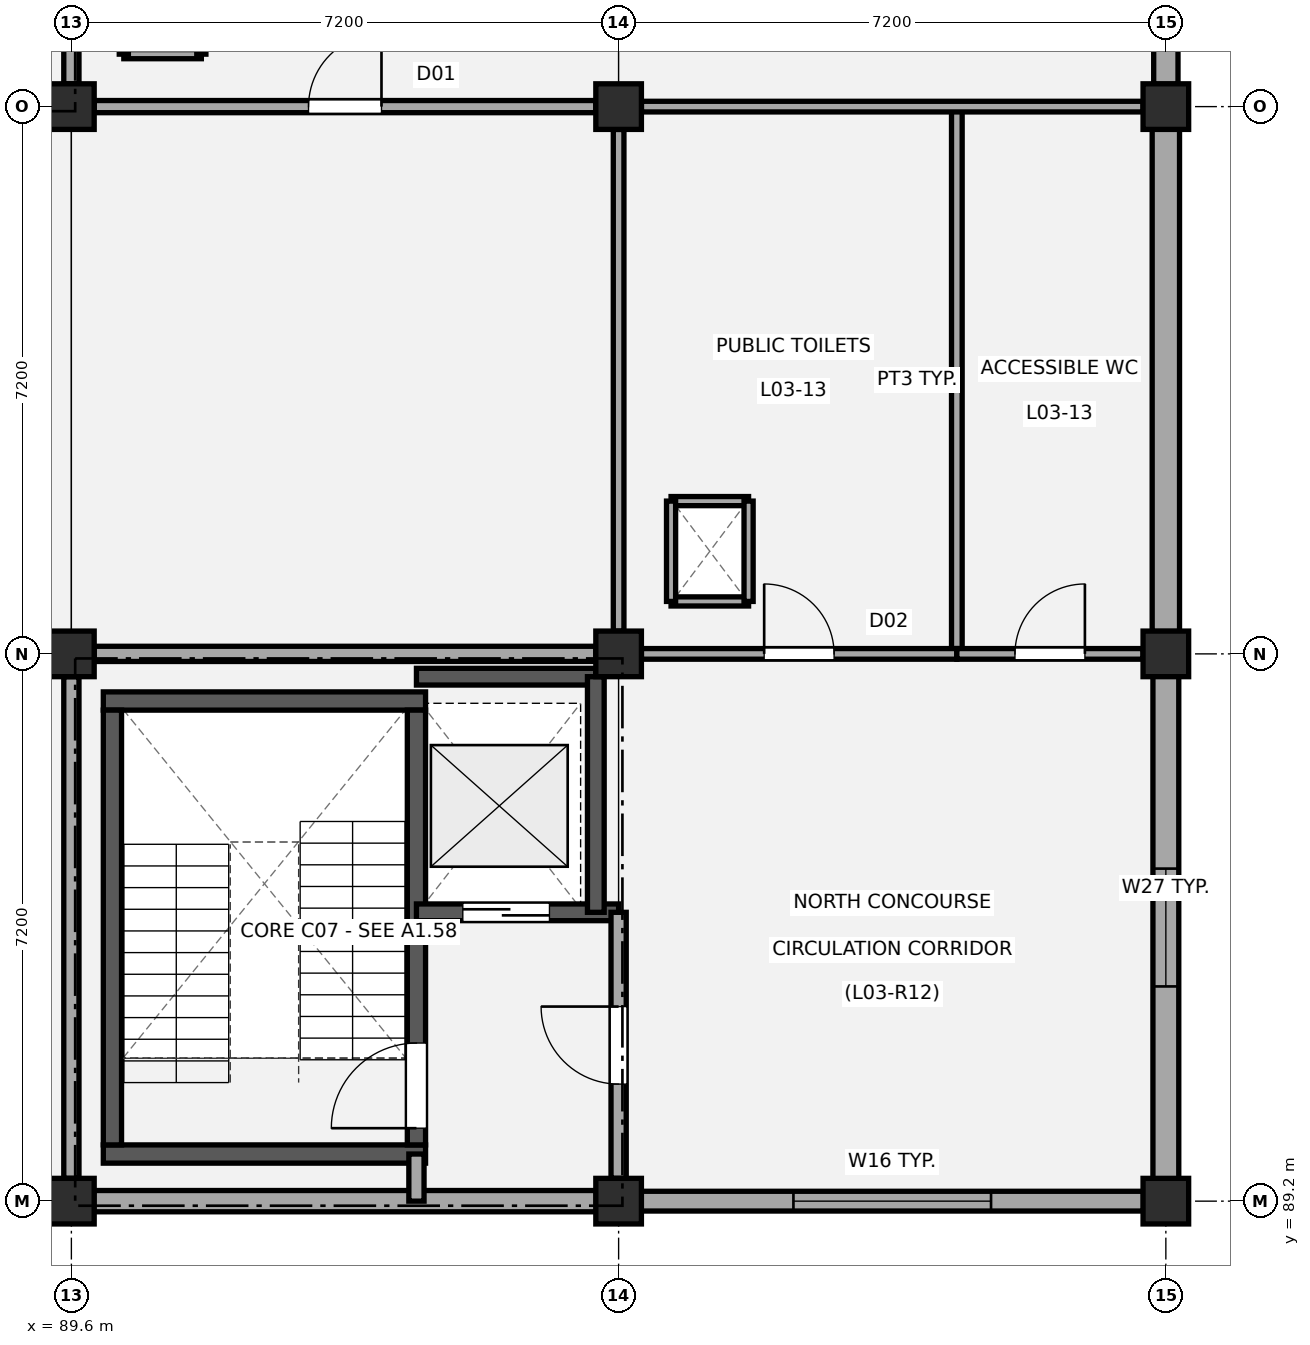
"""IFC4 building model, lengths in metres.
Left out: names, types, materials, properties, quantities, classifications, styles, units other than length and angle.
Written with IfcOpenShell. Run it as: python <this file> out.ifc"""

import sys

from ifc_helpers import new_model, si_unit, direction, frame, frame_2d, origin, origin_2d, place, context, subcontext, project, spatial, rectangle, extrude, element, fill, save


model = new_model("IFC4")
c1 = context("Model", 3, precision=1e-05, world=origin(), true_north=direction((0.0, 1.0)))
c2 = subcontext(c1, "Body", "Model", "MODEL_VIEW")
j1 = project(units=[si_unit("LENGTHUNIT", "METRE"), si_unit("PLANEANGLEUNIT", "RADIAN")], contexts=[c1])
p1 = place(None, origin())
s1 = spatial("IfcSite", under=j1, at=p1, CompositionType="ELEMENT")
p2 = place(p1, origin())
s2 = spatial("IfcBuilding", under=s1, at=p2, CompositionType="ELEMENT")
p3 = place(p2, frame((0.0, 0.0, 13.5)))
s3 = spatial("IfcBuildingStorey", under=s2, at=p3, CompositionType="ELEMENT", Elevation=13.5)
for number, where, z_axis, x_axis in (
    (1, (89.6, 89.2, 0.0), (0.0, 0.0, 1.0), (1.0, 0.0, 0.0)),
    (2, (89.6, 96.4, 0.0), (0.0, 0.0, 1.0), (1.0, 0.0, 0.0)),
    (3, (89.6, 103.6, 0.0), (0.0, 0.0, 1.0), (1.0, 0.0, 0.0)),
    (4, (96.8, 89.2, 0.0), (0.0, 0.0, 1.0), (1.0, 0.0, 0.0)),
    (5, (96.8, 96.4, 0.0), (0.0, 0.0, 1.0), (1.0, 0.0, 0.0)),
    (6, (96.8, 103.6, 0.0), (0.0, 0.0, 1.0), (1.0, 0.0, 0.0)),
    (7, (104.0, 89.2, 0.0), (0.0, 0.0, 1.0), (1.0, 0.0, 0.0)),
    (8, (104.0, 96.4, 0.0), (0.0, 0.0, 1.0), (1.0, 0.0, 0.0)),
    (9, (104.0, 103.6, 0.0), (0.0, 0.0, 1.0), (1.0, 0.0, 0.0)),
):
    element("IfcColumn", number, at=place(p3, frame(where, z_axis=z_axis, x_axis=x_axis)), inside=s3, PredefinedType="COLUMN", context=c2, shape_type="SweptSolid", body=[
        extrude(rectangle(XDim=0.6, YDim=0.6, at=origin_2d()), origin(), (0.0, 0.0, 1.0), 4.14),
    ])
p4 = place(p3, frame((96.505, 89.2, 0.0), z_axis=(0.0, 0.0, 1.0), x_axis=(-1.0, 0.0, 0.0)))
e10 = element("IfcWall", 10, at=p4, inside=s3, PredefinedType="STANDARD", context=c2, shape_type="SweptSolid", body=[
    extrude(rectangle(XDim=6.61, YDim=0.28, at=frame_2d((3.305, 0.0))), origin(), (0.0, 0.0, 1.0), 3.3),
])
p5 = place(p3, frame((103.705, 89.2, 0.0), z_axis=(0.0, 0.0, 1.0), x_axis=(-1.0, 0.0, 0.0)))
e11 = element("IfcWall", 11, at=p5, inside=s3, PredefinedType="STANDARD", context=c2, shape_type="SweptSolid", body=[
    extrude(rectangle(XDim=6.61, YDim=0.26, at=frame_2d((3.305, 0.0))), origin(), (0.0, 0.0, 1.0), 3.32),
])
p6 = place(p5, frame((2.005, 0.0, 0.95)))
e12 = element("IfcOpeningElement", 12, at=p6, cuts=e11, PredefinedType="OPENING", context=c2, shape_type="SweptSolid", body=[
    extrude(rectangle(XDim=2.6, YDim=1.65, at=frame_2d((1.3, 0.825))), frame((0.0, 0.14, 0.0), z_axis=(0.0, -1.0, 0.0), x_axis=(1.0, 0.0, 0.0)), (0.0, 0.0, 1.0), 0.28),
])
p7 = place(p3, frame((104.0, 96.105, 0.0), z_axis=(0.0, 0.0, 1.0), x_axis=(0.0, -1.0, 0.0)))
e13 = element("IfcWall", 13, at=p7, inside=s3, PredefinedType="STANDARD", context=c2, shape_type="SweptSolid", body=[
    extrude(rectangle(XDim=6.61, YDim=0.34, at=frame_2d((3.305, 0.0))), origin(), (0.0, 0.0, 1.0), 3.32),
])
p8 = place(p7, frame((2.53, 0.0, 0.95)))
e14 = element("IfcOpeningElement", 14, at=p8, cuts=e13, PredefinedType="OPENING", context=c2, shape_type="SweptSolid", body=[
    extrude(rectangle(XDim=1.55, YDim=1.25, at=frame_2d((0.775, 0.625))), frame((0.0, 0.18, 0.0), z_axis=(0.0, -1.0, 0.0), x_axis=(1.0, 0.0, 0.0)), (0.0, 0.0, 1.0), 0.36),
])
p9 = place(p3, frame((104.0, 103.305, 0.0), z_axis=(0.0, 0.0, 1.0), x_axis=(0.0, -1.0, 0.0)))
e15 = element("IfcWall", 15, at=p9, inside=s3, PredefinedType="STANDARD", context=c2, shape_type="SweptSolid", body=[
    extrude(rectangle(XDim=6.61, YDim=0.36, at=frame_2d((3.305, 0.0))), origin(), (0.0, 0.0, 1.0), 3.32),
])
p10 = place(p3, frame((104.0, 111.88, 0.0), z_axis=(0.0, 0.0, 1.0), x_axis=(0.0, -1.0, 0.0)))
e16 = element("IfcWall", 16, at=p10, inside=s3, PredefinedType="STANDARD", context=c2, shape_type="SweptSolid", body=[
    extrude(rectangle(XDim=7.985, YDim=0.32, at=frame_2d((3.992, 0.0))), origin(), (0.0, 0.0, 1.0), 3.32),
])
p11 = place(p10, frame((3.117, 0.0, 0.95)))
e17 = element("IfcOpeningElement", 17, at=p11, cuts=e16, PredefinedType="OPENING", context=c2, shape_type="SweptSolid", body=[
    extrude(rectangle(XDim=1.75, YDim=1.3, at=frame_2d((0.875, 0.65))), frame((0.0, 0.17, 0.0), z_axis=(0.0, -1.0, 0.0), x_axis=(1.0, 0.0, 0.0)), (0.0, 0.0, 1.0), 0.34),
])
p12 = place(p3, frame((89.6, 103.9, 0.0), z_axis=(0.0, 0.0, 1.0), x_axis=(0.0, 1.0, 0.0)))
e18 = element("IfcWall", 18, at=p12, inside=s3, PredefinedType="PARTITIONING", context=c2, shape_type="SweptSolid", body=[
    extrude(rectangle(XDim=3.5, YDim=0.2, at=frame_2d((1.75, 0.0))), origin(), (0.0, 0.0, 1.0), 3.2),
])
for number, where, z_axis, x_axis in (
    (19, (90.02, 89.82, 0.0), (0.0, 0.0, 1.0), (1.0, 0.0, 0.0)),
    (20, (90.02, 95.78, 0.0), (0.0, 0.0, 1.0), (1.0, 0.0, 0.0)),
):
    element("IfcWall", number, at=place(p3, frame(where, z_axis=z_axis, x_axis=x_axis)), inside=s3, PredefinedType="SHEAR", context=c2, shape_type="SweptSolid", body=[
        extrude(rectangle(XDim=4.24, YDim=0.24, at=frame_2d((2.12, 0.0))), origin(), (0.0, 0.0, 1.0), 3.86),
    ])
p13 = place(p3, frame((90.14, 89.94, 0.0), z_axis=(0.0, 0.0, 1.0), x_axis=(0.0, 1.0, 0.0)))
e21 = element("IfcWall", 21, at=p13, inside=s3, PredefinedType="SHEAR", context=c2, shape_type="SweptSolid", body=[
    extrude(rectangle(XDim=5.72, YDim=0.24, at=frame_2d((2.86, 0.0))), origin(), (0.0, 0.0, 1.0), 3.86),
])
p14 = place(p3, frame((94.14, 89.94, 0.0), z_axis=(0.0, 0.0, 1.0), x_axis=(0.0, 1.0, 0.0)))
e22 = element("IfcWall", 22, at=p14, inside=s3, PredefinedType="SHEAR", context=c2, shape_type="SweptSolid", body=[
    extrude(rectangle(XDim=5.72, YDim=0.24, at=frame_2d((2.86, 0.0))), origin(), (0.0, 0.0, 1.0), 3.86),
])
p15 = place(p14, frame((0.22, 0.0, 0.0)))
e23 = element("IfcOpeningElement", 23, at=p15, cuts=e22, PredefinedType="OPENING", context=c2, shape_type="SweptSolid", body=[
    extrude(rectangle(XDim=1.12, YDim=2.15, at=frame_2d((0.56, 1.075))), frame((0.0, 0.13, 0.0), z_axis=(0.0, -1.0, 0.0), x_axis=(1.0, 0.0, 0.0)), (0.0, 0.0, 1.0), 0.26),
])
p16 = place(p3, frame((94.14, 93.0, 0.0), z_axis=(0.0, 0.0, 1.0), x_axis=(1.0, 0.0, 0.0)))
e24 = element("IfcWall", 24, at=p16, inside=s3, PredefinedType="SHEAR", context=c2, shape_type="SweptSolid", body=[
    extrude(rectangle(XDim=2.66, YDim=0.22, at=frame_2d((1.33, 0.0))), origin(), (0.0, 0.0, 1.0), 3.86),
])
p17 = place(p16, frame((0.61, 0.0, 0.0)))
e25 = element("IfcOpeningElement", 25, at=p17, cuts=e24, PredefinedType="OPENING", context=c2, shape_type="SweptSolid", body=[
    extrude(rectangle(XDim=1.14, YDim=2.15, at=frame_2d((0.57, 1.075))), frame((0.0, 0.12, 0.0), z_axis=(0.0, -1.0, 0.0), x_axis=(1.0, 0.0, 0.0)), (0.0, 0.0, 1.0), 0.24),
])
p18 = place(p3, frame((94.14, 96.1, 0.0), z_axis=(0.0, 0.0, 1.0), x_axis=(1.0, 0.0, 0.0)))
e26 = element("IfcWall", 26, at=p18, inside=s3, PredefinedType="SHEAR", context=c2, shape_type="SweptSolid", body=[
    extrude(rectangle(XDim=2.36, YDim=0.22, at=frame_2d((1.18, 0.0))), origin(), (0.0, 0.0, 1.0), 3.86),
])
p19 = place(p3, frame((96.5, 93.0, 0.0), z_axis=(0.0, 0.0, 1.0), x_axis=(0.0, 1.0, 0.0)))
e27 = element("IfcWall", 27, at=p19, inside=s3, PredefinedType="SHEAR", context=c2, shape_type="SweptSolid", body=[
    extrude(rectangle(XDim=3.1, YDim=0.22, at=frame_2d((1.55, 0.0))), origin(), (0.0, 0.0, 1.0), 3.86),
])
p20 = place(p3, frame((94.14, 89.2, 0.0), z_axis=(0.0, 0.0, 1.0), x_axis=(0.0, 1.0, 0.0)))
e28 = element("IfcWall", 28, at=p20, inside=s3, PredefinedType="PARTITIONING", context=c2, shape_type="SweptSolid", body=[
    extrude(rectangle(XDim=0.62, YDim=0.2, at=frame_2d((0.31, 0.0))), origin(), (0.0, 0.0, 1.0), 3.3),
])
p21 = place(p3, frame((89.6, 89.5, 0.0), z_axis=(0.0, 0.0, 1.0), x_axis=(0.0, 1.0, 0.0)))
e29 = element("IfcWall", 29, at=p21, inside=s3, PredefinedType="PARTITIONING", context=c2, shape_type="SweptSolid", body=[
    extrude(rectangle(XDim=6.6, YDim=0.2, at=frame_2d((3.3, 0.0))), origin(), (0.0, 0.0, 1.0), 3.2),
])
p22 = place(p3, frame((96.8, 89.5, 0.0), z_axis=(0.0, 0.0, 1.0), x_axis=(0.0, 1.0, 0.0)))
e30 = element("IfcWall", 30, at=p22, inside=s3, PredefinedType="PARTITIONING", context=c2, shape_type="SweptSolid", body=[
    extrude(rectangle(XDim=3.5, YDim=0.2, at=frame_2d((1.75, 0.0))), origin(), (0.0, 0.0, 1.0), 3.2),
])
p23 = place(p22, frame((1.24, 0.0, 0.0)))
e31 = element("IfcOpeningElement", 31, at=p23, cuts=e30, PredefinedType="OPENING", context=c2, shape_type="SweptSolid", body=[
    extrude(rectangle(XDim=1.02, YDim=2.15, at=frame_2d((0.51, 1.075))), frame((0.0, 0.11, 0.0), z_axis=(0.0, -1.0, 0.0), x_axis=(1.0, 0.0, 0.0)), (0.0, 0.0, 1.0), 0.22),
])
p24 = place(p3, frame((89.9, 96.4, 0.0), z_axis=(0.0, 0.0, 1.0), x_axis=(1.0, 0.0, 0.0)))
e32 = element("IfcWall", 32, at=p24, inside=s3, PredefinedType="PARTITIONING", context=c2, shape_type="SweptSolid", body=[
    extrude(rectangle(XDim=6.6, YDim=0.2, at=frame_2d((3.3, 0.0))), origin(), (0.0, 0.0, 1.0), 3.25),
])
p25 = place(p3, frame((90.29, 104.29, 0.0), z_axis=(0.0, 0.0, 1.0), x_axis=(1.0, 0.0, 0.0)))
e33 = element("IfcWall", 33, at=p25, inside=s3, PredefinedType="PARTITIONING", context=c2, shape_type="SweptSolid", body=[
    extrude(rectangle(XDim=1.02, YDim=0.12, at=frame_2d((0.51, 0.0))), origin(), (0.0, 0.0, 1.0), 3.84),
])
for number, where, z_axis, x_axis in (
    (34, (90.29, 104.29, 0.0), (0.0, 0.0, 1.0), (0.0, 1.0, 0.0)),
    (35, (91.31, 104.29, 0.0), (0.0, 0.0, 1.0), (0.0, 1.0, 0.0)),
):
    element("IfcWall", number, at=place(p3, frame(where, z_axis=z_axis, x_axis=x_axis)), inside=s3, PredefinedType="PARTITIONING", context=c2, shape_type="SweptSolid", body=[
        extrude(rectangle(XDim=1.32, YDim=0.12, at=frame_2d((0.66, 0.0))), origin(), (0.0, 0.0, 1.0), 3.84),
    ])
for number, where, z_axis, x_axis in (
    (36, (97.49, 97.09, 0.0), (0.0, 0.0, 1.0), (1.0, 0.0, 0.0)),
    (37, (97.49, 98.41, 0.0), (0.0, 0.0, 1.0), (1.0, 0.0, 0.0)),
):
    element("IfcWall", number, at=place(p3, frame(where, z_axis=z_axis, x_axis=x_axis)), inside=s3, PredefinedType="PARTITIONING", context=c2, shape_type="SweptSolid", body=[
        extrude(rectangle(XDim=1.02, YDim=0.12, at=frame_2d((0.51, 0.0))), origin(), (0.0, 0.0, 1.0), 3.86),
    ])
for number, where, z_axis, x_axis in (
    (38, (97.49, 97.09, 0.0), (0.0, 0.0, 1.0), (0.0, 1.0, 0.0)),
    (39, (98.51, 97.09, 0.0), (0.0, 0.0, 1.0), (0.0, 1.0, 0.0)),
):
    element("IfcWall", number, at=place(p3, frame(where, z_axis=z_axis, x_axis=x_axis)), inside=s3, PredefinedType="PARTITIONING", context=c2, shape_type="SweptSolid", body=[
        extrude(rectangle(XDim=1.32, YDim=0.12, at=frame_2d((0.66, 0.0))), origin(), (0.0, 0.0, 1.0), 3.86),
    ])
p26 = place(p3, frame((101.25, 96.4, 0.0), z_axis=(0.0, 0.0, 1.0), x_axis=(0.0, 1.0, 0.0)))
e40 = element("IfcWall", 40, at=p26, inside=s3, PredefinedType="PARTITIONING", context=c2, shape_type="SweptSolid", body=[
    extrude(rectangle(XDim=7.2, YDim=0.14, at=frame_2d((3.6, 0.0))), origin(), (0.0, 0.0, 1.0), 3.3),
])
p27 = place(p3, frame((97.1, 96.4, 0.0), z_axis=(0.0, 0.0, 1.0), x_axis=(1.0, 0.0, 0.0)))
e41 = element("IfcWall", 41, at=p27, inside=s3, PredefinedType="PARTITIONING", context=c2, shape_type="SweptSolid", body=[
    extrude(rectangle(XDim=4.15, YDim=0.14, at=frame_2d((2.075, 0.0))), origin(), (0.0, 0.0, 1.0), 3.22),
])
p28 = place(p27, frame((1.615, 0.0, 0.0)))
e42 = element("IfcOpeningElement", 42, at=p28, cuts=e41, PredefinedType="OPENING", context=c2, shape_type="SweptSolid", body=[
    extrude(rectangle(XDim=0.92, YDim=2.08, at=frame_2d((0.46, 1.04))), frame((0.0, 0.08, 0.0), z_axis=(0.0, -1.0, 0.0), x_axis=(1.0, 0.0, 0.0)), (0.0, 0.0, 1.0), 0.16),
])
p29 = place(p3, frame((101.25, 96.4, 0.0), z_axis=(0.0, 0.0, 1.0), x_axis=(1.0, 0.0, 0.0)))
e43 = element("IfcWall", 43, at=p29, inside=s3, PredefinedType="PARTITIONING", context=c2, shape_type="SweptSolid", body=[
    extrude(rectangle(XDim=2.45, YDim=0.14, at=frame_2d((1.225, 0.0))), origin(), (0.0, 0.0, 1.0), 3.22),
])
p30 = place(p29, frame((0.765, 0.0, 0.0)))
e44 = element("IfcOpeningElement", 44, at=p30, cuts=e43, PredefinedType="OPENING", context=c2, shape_type="SweptSolid", body=[
    extrude(rectangle(XDim=0.92, YDim=2.08, at=frame_2d((0.46, 1.04))), frame((0.0, 0.08, 0.0), z_axis=(0.0, -1.0, 0.0), x_axis=(1.0, 0.0, 0.0)), (0.0, 0.0, 1.0), 0.16),
])
p31 = place(p3, frame((97.1, 103.6, 0.0), z_axis=(0.0, 0.0, 1.0), x_axis=(1.0, 0.0, 0.0)))
e45 = element("IfcWall", 45, at=p31, inside=s3, PredefinedType="PARTITIONING", context=c2, shape_type="SweptSolid", body=[
    extrude(rectangle(XDim=6.6, YDim=0.14, at=frame_2d((3.3, 0.0))), origin(), (0.0, 0.0, 1.0), 3.27),
])
p32 = place(p3, frame((96.8, 96.7, 0.0), z_axis=(0.0, 0.0, 1.0), x_axis=(0.0, 1.0, 0.0)))
e46 = element("IfcWall", 46, at=p32, inside=s3, PredefinedType="PARTITIONING", context=c2, shape_type="SweptSolid", body=[
    extrude(rectangle(XDim=6.6, YDim=0.14, at=frame_2d((3.3, 0.0))), origin(), (0.0, 0.0, 1.0), 3.25),
])
p33 = place(p3, frame((89.9, 103.6, 0.0), z_axis=(0.0, 0.0, 1.0), x_axis=(1.0, 0.0, 0.0)))
e47 = element("IfcWall", 47, at=p33, inside=s3, PredefinedType="PARTITIONING", context=c2, shape_type="SweptSolid", body=[
    extrude(rectangle(XDim=6.6, YDim=0.16, at=frame_2d((3.3, 0.0))), origin(), (0.0, 0.0, 1.0), 3.2),
])
p34 = place(p33, frame((2.82, 0.0, 0.0)))
e48 = element("IfcOpeningElement", 48, at=p34, cuts=e47, PredefinedType="OPENING", context=c2, shape_type="SweptSolid", body=[
    extrude(rectangle(XDim=0.96, YDim=2.1, at=frame_2d((0.48, 1.05))), frame((0.0, 0.09, 0.0), z_axis=(0.0, -1.0, 0.0), x_axis=(1.0, 0.0, 0.0)), (0.0, 0.0, 1.0), 0.18),
])
p35 = place(p6, origin())
e49 = element("IfcWindow", 49, at=p35, inside=s3, PartitioningType="SINGLE_PANEL", PredefinedType="WINDOW", context=c2, shape_type="SweptSolid", body=[
    extrude(rectangle(XDim=2.6, YDim=1.65, at=frame_2d((1.3, 0.825))), frame((0.0, 0.03, 0.0), z_axis=(0.0, -1.0, 0.0), x_axis=(1.0, 0.0, 0.0)), (0.0, 0.0, 1.0), 0.06),
])
fill(e12, e49)
p36 = place(p8, origin())
e50 = element("IfcWindow", 50, at=p36, inside=s3, PartitioningType="SINGLE_PANEL", PredefinedType="WINDOW", context=c2, shape_type="SweptSolid", body=[
    extrude(rectangle(XDim=1.55, YDim=1.25, at=frame_2d((0.775, 0.625))), frame((0.0, 0.03, 0.0), z_axis=(0.0, -1.0, 0.0), x_axis=(1.0, 0.0, 0.0)), (0.0, 0.0, 1.0), 0.06),
])
fill(e14, e50)
p37 = place(p15, origin())
e51 = element("IfcDoor", 51, at=p37, inside=s3, OperationType="SINGLE_SWING_LEFT", PredefinedType="DOOR", context=c2, shape_type="SweptSolid", body=[
    extrude(rectangle(XDim=1.12, YDim=2.15, at=frame_2d((0.56, 1.075))), frame((0.0, 0.025, 0.0), z_axis=(0.0, -1.0, 0.0), x_axis=(1.0, 0.0, 0.0)), (0.0, 0.0, 1.0), 0.05),
])
fill(e23, e51)
p38 = place(p17, origin())
e52 = element("IfcDoor", 52, at=p38, inside=s3, OperationType="SLIDING_TO_LEFT", PredefinedType="DOOR", context=c2, shape_type="SweptSolid", body=[
    extrude(rectangle(XDim=1.14, YDim=2.15, at=frame_2d((0.57, 1.075))), frame((0.0, 0.025, 0.0), z_axis=(0.0, -1.0, 0.0), x_axis=(1.0, 0.0, 0.0)), (0.0, 0.0, 1.0), 0.05),
])
fill(e25, e52)
p39 = place(p23, origin())
e53 = element("IfcDoor", 53, at=p39, inside=s3, OperationType="SINGLE_SWING_RIGHT", PredefinedType="DOOR", context=c2, shape_type="SweptSolid", body=[
    extrude(rectangle(XDim=1.02, YDim=2.15, at=frame_2d((0.51, 1.075))), frame((0.0, 0.025, 0.0), z_axis=(0.0, -1.0, 0.0), x_axis=(1.0, 0.0, 0.0)), (0.0, 0.0, 1.0), 0.05),
])
fill(e31, e53)
p40 = place(p28, origin())
e54 = element("IfcDoor", 54, at=p40, inside=s3, OperationType="SINGLE_SWING_LEFT", PredefinedType="DOOR", context=c2, shape_type="SweptSolid", body=[
    extrude(rectangle(XDim=0.92, YDim=2.08, at=frame_2d((0.46, 1.04))), frame((0.0, 0.025, 0.0), z_axis=(0.0, -1.0, 0.0), x_axis=(1.0, 0.0, 0.0)), (0.0, 0.0, 1.0), 0.05),
])
fill(e42, e54)
p41 = place(p30, origin())
e55 = element("IfcDoor", 55, at=p41, inside=s3, OperationType="SINGLE_SWING_RIGHT", PredefinedType="DOOR", context=c2, shape_type="SweptSolid", body=[
    extrude(rectangle(XDim=0.92, YDim=2.08, at=frame_2d((0.46, 1.04))), frame((0.0, 0.025, 0.0), z_axis=(0.0, -1.0, 0.0), x_axis=(1.0, 0.0, 0.0)), (0.0, 0.0, 1.0), 0.05),
])
fill(e44, e55)
p42 = place(p34, origin())
e56 = element("IfcDoor", 56, at=p42, inside=s3, OperationType="SINGLE_SWING_RIGHT", PredefinedType="DOOR", context=c2, shape_type="SweptSolid", body=[
    extrude(rectangle(XDim=0.96, YDim=2.1, at=frame_2d((0.48, 1.05))), frame((0.0, 0.025, 0.0), z_axis=(0.0, -1.0, 0.0), x_axis=(1.0, 0.0, 0.0)), (0.0, 0.0, 1.0), 0.05),
])
fill(e48, e56)
save(model, sys.argv[1])
